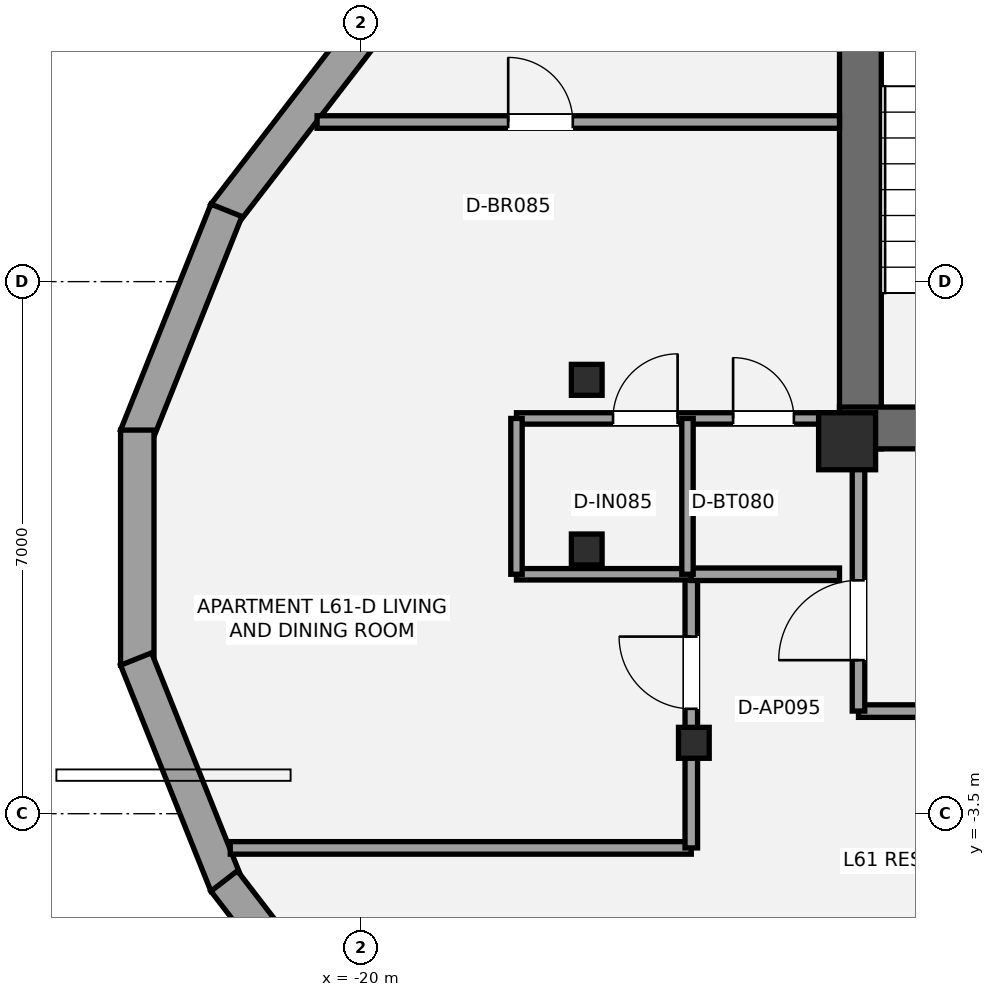
"""IFC4 building model, lengths in metres.
Left out: names, types, materials, properties, quantities, classifications, styles, units other than length and angle.
Written with IfcOpenShell. Run it as: python <this file> out.ifc"""

import sys

from ifc_helpers import new_model, si_unit, direction, frame, frame_2d, origin, origin_2d, place, context, subcontext, project, spatial, rectangle, i_section, extrude, element, fill, save


model = new_model("IFC4")
c1 = context("Model", 3, precision=1e-05, world=origin(), true_north=direction((0.0, 1.0)))
c2 = subcontext(c1, "Body", "Model", "MODEL_VIEW")
j1 = project(units=[si_unit("LENGTHUNIT", "METRE"), si_unit("PLANEANGLEUNIT", "RADIAN")], contexts=[c1])
p1 = place(None, origin())
s1 = spatial("IfcSite", under=j1, at=p1, CompositionType="ELEMENT")
p2 = place(p1, origin())
s2 = spatial("IfcBuilding", under=s1, at=p2, CompositionType="ELEMENT")
p3 = place(p2, frame((0.0, 0.0, 219.45)))
s3 = spatial("IfcBuildingStorey", under=s2, at=p3, CompositionType="ELEMENT", Elevation=219.45)
p4 = place(p3, frame((-13.425, 1.3, 0.0), z_axis=(0.0, 0.0, 1.0), x_axis=(0.0, 1.0, 0.0)))
e1 = element("IfcWall", 1, at=p4, inside=s3, PredefinedType="SHEAR", context=c2, shape_type="SweptSolid", body=[
    extrude(rectangle(XDim=8.25, YDim=0.55, at=frame_2d((4.125, 0.0))), origin(), (0.0, 0.0, 1.0), 3.15),
])
p5 = place(p3, frame((-4.925, 1.575, 0.0), z_axis=(0.0, 0.0, 1.0), x_axis=(-1.0, 0.0, 0.0)))
e2 = element("IfcWall", 2, at=p5, inside=s3, PredefinedType="SHEAR", context=c2, shape_type="SweptSolid", body=[
    extrude(rectangle(XDim=8.775, YDim=0.55, at=frame_2d((4.387, 0.0))), origin(), (0.0, 0.0, 1.0), 3.15),
])
p6 = place(p5, frame((5.375, 0.0, 0.0)))
e3 = element("IfcOpeningElement", 3, at=p6, cuts=e2, PredefinedType="OPENING", context=c2, shape_type="SweptSolid", body=[
    extrude(rectangle(XDim=1.05, YDim=2.15, at=frame_2d((0.525, 1.075))), frame((0.0, 0.285, 0.0), z_axis=(0.0, -1.0, 0.0), x_axis=(1.0, 0.0, 0.0)), (0.0, 0.0, 1.0), 0.57),
])
p7 = place(p5, frame((3.705, 0.0, 0.0)))
e4 = element("IfcOpeningElement", 4, at=p7, cuts=e2, PredefinedType="OPENING", context=c2, shape_type="SweptSolid", body=[
    extrude(rectangle(XDim=1.1, YDim=2.2, at=frame_2d((0.55, 1.1))), frame((0.0, 0.285, 0.0), z_axis=(0.0, -1.0, 0.0), x_axis=(1.0, 0.0, 0.0)), (0.0, 0.0, 1.0), 0.57),
])
p8 = place(p3, frame((-13.6, 1.4, 0.0), z_axis=(0.0, 0.0, 1.0), x_axis=(1.0, 0.0, 0.0)))
e5 = element("IfcColumn", 5, at=p8, inside=s3, PredefinedType="PILASTER", context=c2, shape_type="SweptSolid", body=[
    extrude(rectangle(XDim=0.75, YDim=0.75, at=origin_2d()), origin(), (0.0, 0.0, 1.0), 3.15),
])
for number, where, z_axis, x_axis in (
    (6, (-17.026, 2.208, 0.0), (0.0, 0.0, 1.0), (1.0, 0.0, 0.0)),
    (7, (-17.026, -0.024, 0.0), (0.0, 0.0, 1.0), (1.0, 0.0, 0.0)),
    (8, (-15.616, -2.567, 0.0), (0.0, 0.0, 1.0), (1.0, 0.0, 0.0)),
):
    element("IfcColumn", number, at=place(p3, frame(where, z_axis=z_axis, x_axis=x_axis)), inside=s3, PredefinedType="COLUMN", context=c2, shape_type="SweptSolid", body=[
        extrude(i_section(OverallWidth=0.404, OverallDepth=0.407, WebThickness=0.027, FlangeThickness=0.044, at=origin_2d()), origin(), (0.0, 0.0, 1.0), 3.15),
    ])
p9 = place(p3, frame((-21.796, 4.386, 0.0), z_axis=(0.0, 0.0, 1.0), x_axis=(0.61008909013, 0.792332822811, 0.0)))
e9 = element("IfcWall", 9, at=p9, inside=s3, PredefinedType="STANDARD", context=c2, shape_type="SweptSolid", body=[
    extrude(rectangle(XDim=3.399, YDim=0.44, at=frame_2d((1.699, 0.0))), origin(), (0.0, 0.0, 1.0), 2.336),
])
p10 = place(p3, frame((-22.955, 1.465, 0.0), z_axis=(0.0, 0.0, 1.0), x_axis=(0.371272350835, 0.928524012347, 0.0)))
e10 = element("IfcWall", 10, at=p10, inside=s3, PredefinedType="STANDARD", context=c2, shape_type="SweptSolid", body=[
    extrude(rectangle(XDim=3.202, YDim=0.44, at=frame_2d((1.601, 0.0))), origin(), (0.0, 0.0, 1.0), 2.336),
])
p11 = place(p3, frame((-22.939, -1.547, 0.0), z_axis=(0.0, 0.0, 1.0), x_axis=(0.0, 1.0, 0.0)))
e11 = element("IfcWall", 11, at=p11, inside=s3, PredefinedType="STANDARD", context=c2, shape_type="SweptSolid", body=[
    extrude(rectangle(XDim=3.094, YDim=0.44, at=frame_2d((1.547, 0.0))), origin(), (0.0, 0.0, 1.0), 2.336),
])
p12 = place(p3, frame((-21.766, -4.438, 0.0), z_axis=(0.0, 0.0, 1.0), x_axis=(-0.371272350835, 0.928524012347, 0.0)))
e12 = element("IfcWall", 12, at=p12, inside=s3, PredefinedType="STANDARD", context=c2, shape_type="SweptSolid", body=[
    extrude(rectangle(XDim=3.202, YDim=0.44, at=frame_2d((1.601, 0.0))), origin(), (0.0, 0.0, 1.0), 2.336),
])
p13 = place(p3, frame((-19.723, -7.079, 0.0), z_axis=(0.0, 0.0, 1.0), x_axis=(-0.61008909013, 0.792332822811, 0.0)))
e13 = element("IfcWall", 13, at=p13, inside=s3, PredefinedType="STANDARD", context=c2, shape_type="SweptSolid", body=[
    extrude(rectangle(XDim=3.399, YDim=0.44, at=frame_2d((1.699, 0.0))), origin(), (0.0, 0.0, 1.0), 2.336),
])
p14 = place(p3, frame((-13.45, -2.15, 0.0), z_axis=(0.0, 0.0, 1.0), x_axis=(1.0, 0.0, 0.0)))
e14 = element("IfcWall", 14, at=p14, inside=s3, PredefinedType="PARTITIONING", context=c2, shape_type="SweptSolid", body=[
    extrude(rectangle(XDim=6.25, YDim=0.165, at=frame_2d((3.125, 0.0))), origin(), (0.0, 0.0, 1.0), 2.423),
])
p15 = place(p3, frame((-13.45, -2.15, 0.0), z_axis=(0.0, 0.0, 1.0), x_axis=(0.0, 1.0, 0.0)))
e15 = element("IfcWall", 15, at=p15, inside=s3, PredefinedType="PARTITIONING", context=c2, shape_type="SweptSolid", body=[
    extrude(rectangle(XDim=3.5, YDim=0.165, at=frame_2d((1.75, 0.0))), origin(), (0.0, 0.0, 1.0), 2.423),
])
p16 = place(p15, frame((0.67, 0.0, 0.0)))
e16 = element("IfcOpeningElement", 16, at=p16, cuts=e15, PredefinedType="OPENING", context=c2, shape_type="SweptSolid", body=[
    extrude(rectangle(XDim=1.05, YDim=2.15, at=frame_2d((0.525, 1.075))), frame((0.0, 0.093, 0.0), z_axis=(0.0, -1.0, 0.0), x_axis=(1.0, 0.0, 0.0)), (0.0, 0.0, 1.0), 0.185),
])
p17 = place(p3, frame((-21.716, -3.95, 0.0), z_axis=(0.0, 0.0, 1.0), x_axis=(1.0, 0.0, 0.0)))
e17 = element("IfcWall", 17, at=p17, inside=s3, PredefinedType="PARTITIONING", context=c2, shape_type="SweptSolid", body=[
    extrude(rectangle(XDim=6.066, YDim=0.165, at=frame_2d((3.033, 0.0))), origin(), (0.0, 0.0, 1.0), 2.423),
])
p18 = place(p3, frame((-15.65, -3.95, 0.0), z_axis=(0.0, 0.0, 1.0), x_axis=(0.0, 1.0, 0.0)))
e18 = element("IfcWall", 18, at=p18, inside=s3, PredefinedType="PARTITIONING", context=c2, shape_type="SweptSolid", body=[
    extrude(rectangle(XDim=3.6, YDim=0.165, at=frame_2d((1.8, 0.0))), origin(), (0.0, 0.0, 1.0), 2.357),
])
p19 = place(p18, frame((1.83, 0.0, 0.0)))
e19 = element("IfcOpeningElement", 19, at=p19, cuts=e18, PredefinedType="OPENING", context=c2, shape_type="SweptSolid", body=[
    extrude(rectangle(XDim=0.95, YDim=2.15, at=frame_2d((0.475, 1.075))), frame((0.0, 0.093, 0.0), z_axis=(0.0, -1.0, 0.0), x_axis=(1.0, 0.0, 0.0)), (0.0, 0.0, 1.0), 0.185),
])
p20 = place(p3, frame((-15.65, -0.35, 0.0), z_axis=(0.0, 0.0, 1.0), x_axis=(1.0, 0.0, 0.0)))
e20 = element("IfcWall", 20, at=p20, inside=s3, PredefinedType="PARTITIONING", context=c2, shape_type="SweptSolid", body=[
    extrude(rectangle(XDim=1.95, YDim=0.165, at=frame_2d((0.975, 0.0))), origin(), (0.0, 0.0, 1.0), 2.97),
])
p21 = place(p3, frame((-20.573, 5.6, 0.0), z_axis=(0.0, 0.0, 1.0), x_axis=(1.0, 0.0, 0.0)))
e21 = element("IfcWall", 21, at=p21, inside=s3, PredefinedType="PARTITIONING", context=c2, shape_type="SweptSolid", body=[
    extrude(rectangle(XDim=6.874, YDim=0.165, at=frame_2d((3.437, 0.0))), origin(), (0.0, 0.0, 1.0), 2.423),
])
p22 = place(p21, frame((2.514, 0.0, 0.0)))
e22 = element("IfcOpeningElement", 22, at=p22, cuts=e21, PredefinedType="OPENING", context=c2, shape_type="SweptSolid", body=[
    extrude(rectangle(XDim=0.85, YDim=2.1, at=frame_2d((0.425, 1.05))), frame((0.0, 0.093, 0.0), z_axis=(0.0, -1.0, 0.0), x_axis=(1.0, 0.0, 0.0)), (0.0, 0.0, 1.0), 0.185),
])
p23 = place(p3, frame((-17.95, 1.7, 0.0), z_axis=(0.0, 0.0, 1.0), x_axis=(1.0, 0.0, 0.0)))
e23 = element("IfcWall", 23, at=p23, inside=s3, PredefinedType="PLUMBINGWALL", context=c2, shape_type="SweptSolid", body=[
    extrude(rectangle(XDim=4.25, YDim=0.15, at=frame_2d((2.125, 0.0))), origin(), (0.0, 0.0, 1.0), 2.423),
])
p24 = place(p23, frame((2.85, 0.0, 0.0)))
e24 = element("IfcOpeningElement", 24, at=p24, cuts=e23, PredefinedType="OPENING", context=c2, shape_type="SweptSolid", body=[
    extrude(rectangle(XDim=0.8, YDim=2.1, at=frame_2d((0.4, 1.05))), frame((0.0, 0.085, 0.0), z_axis=(0.0, -1.0, 0.0), x_axis=(1.0, 0.0, 0.0)), (0.0, 0.0, 1.0), 0.17),
])
p25 = place(p23, frame((1.27, 0.0, 0.0)))
e25 = element("IfcOpeningElement", 25, at=p25, cuts=e23, PredefinedType="OPENING", context=c2, shape_type="SweptSolid", body=[
    extrude(rectangle(XDim=0.85, YDim=2.1, at=frame_2d((0.425, 1.05))), frame((0.0, 0.085, 0.0), z_axis=(0.0, -1.0, 0.0), x_axis=(1.0, 0.0, 0.0)), (0.0, 0.0, 1.0), 0.17),
])
p26 = place(p3, frame((-17.95, -0.35, 0.0), z_axis=(0.0, 0.0, 1.0), x_axis=(1.0, 0.0, 0.0)))
e26 = element("IfcWall", 26, at=p26, inside=s3, PredefinedType="PLUMBINGWALL", context=c2, shape_type="SweptSolid", body=[
    extrude(rectangle(XDim=2.3, YDim=0.15, at=frame_2d((1.15, 0.0))), origin(), (0.0, 0.0, 1.0), 2.423),
])
p27 = place(p3, frame((-15.7, -0.35, 0.0), z_axis=(0.0, 0.0, 1.0), x_axis=(0.0, 1.0, 0.0)))
e27 = element("IfcWall", 27, at=p27, inside=s3, PredefinedType="PLUMBINGWALL", context=c2, shape_type="SweptSolid", body=[
    extrude(rectangle(XDim=2.05, YDim=0.15, at=frame_2d((1.025, 0.0))), origin(), (0.0, 0.0, 1.0), 2.97),
])
p28 = place(p3, frame((-17.95, -0.35, 0.0), z_axis=(0.0, 0.0, 1.0), x_axis=(0.0, 1.0, 0.0)))
e28 = element("IfcWall", 28, at=p28, inside=s3, PredefinedType="PLUMBINGWALL", context=c2, shape_type="SweptSolid", body=[
    extrude(rectangle(XDim=2.05, YDim=0.15, at=frame_2d((1.025, 0.0))), origin(), (0.0, 0.0, 1.0), 2.423),
])
p29 = place(p16, origin())
e29 = element("IfcDoor", 29, at=p29, inside=s3, OperationType="SINGLE_SWING_LEFT", PredefinedType="DOOR", context=c2, shape_type="SweptSolid", body=[
    extrude(rectangle(XDim=1.05, YDim=2.15, at=frame_2d((0.525, 1.075))), frame((0.0, 0.025, 0.0), z_axis=(0.0, -1.0, 0.0), x_axis=(1.0, 0.0, 0.0)), (0.0, 0.0, 1.0), 0.05),
])
fill(e16, e29)
p30 = place(p19, origin())
e30 = element("IfcDoor", 30, at=p30, inside=s3, OperationType="SINGLE_SWING_RIGHT", PredefinedType="DOOR", context=c2, shape_type="SweptSolid", body=[
    extrude(rectangle(XDim=0.95, YDim=2.15, at=frame_2d((0.475, 1.075))), frame((0.0, 0.025, 0.0), z_axis=(0.0, -1.0, 0.0), x_axis=(1.0, 0.0, 0.0)), (0.0, 0.0, 1.0), 0.05),
])
fill(e19, e30)
p31 = place(p24, origin())
e31 = element("IfcDoor", 31, at=p31, inside=s3, OperationType="SINGLE_SWING_LEFT", PredefinedType="DOOR", context=c2, shape_type="SweptSolid", body=[
    extrude(rectangle(XDim=0.8, YDim=2.1, at=frame_2d((0.4, 1.05))), frame((0.0, 0.025, 0.0), z_axis=(0.0, -1.0, 0.0), x_axis=(1.0, 0.0, 0.0)), (0.0, 0.0, 1.0), 0.05),
])
fill(e24, e31)
p32 = place(p25, origin())
e32 = element("IfcDoor", 32, at=p32, inside=s3, OperationType="SINGLE_SWING_RIGHT", PredefinedType="DOOR", context=c2, shape_type="SweptSolid", body=[
    extrude(rectangle(XDim=0.85, YDim=2.1, at=frame_2d((0.425, 1.05))), frame((0.0, 0.025, 0.0), z_axis=(0.0, -1.0, 0.0), x_axis=(1.0, 0.0, 0.0)), (0.0, 0.0, 1.0), 0.05),
])
fill(e25, e32)
p33 = place(p22, origin())
e33 = element("IfcDoor", 33, at=p33, inside=s3, OperationType="SINGLE_SWING_LEFT", PredefinedType="DOOR", context=c2, shape_type="SweptSolid", body=[
    extrude(rectangle(XDim=0.85, YDim=2.1, at=frame_2d((0.425, 1.05))), frame((0.0, 0.025, 0.0), z_axis=(0.0, -1.0, 0.0), x_axis=(1.0, 0.0, 0.0)), (0.0, 0.0, 1.0), 0.05),
])
fill(e22, e33)
save(model, sys.argv[1])
